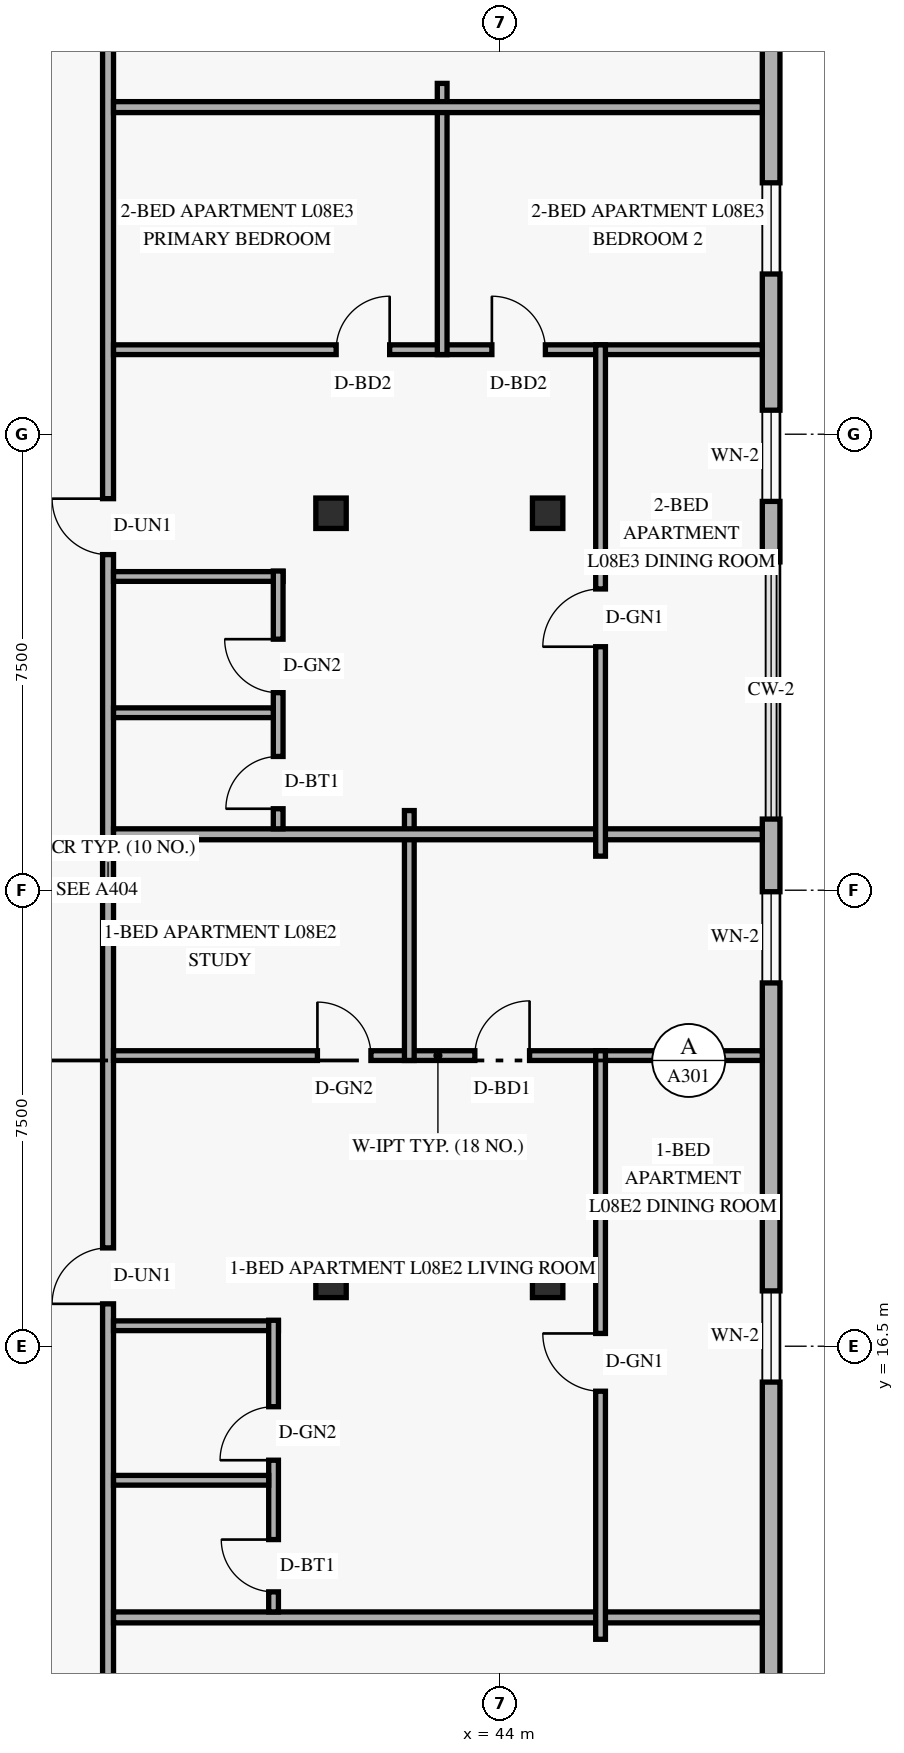
"""IFC4 building model, lengths in metres.
Left out: names, types, materials, properties, quantities, classifications, styles, units other than length and angle.
Written with IfcOpenShell. Run it as: python <this file> out.ifc"""

import sys

from ifc_helpers import new_model, si_unit, direction, frame, frame_2d, origin, origin_2d, place, context, subcontext, project, spatial, rectangle, hollow_rectangle, extrude, element, fill, save


model = new_model("IFC4")
c1 = context("Model", 3, precision=1e-05, world=origin(), true_north=direction((0.0, 1.0)))
c2 = subcontext(c1, "Body", "Model", "MODEL_VIEW")
j1 = project(units=[si_unit("LENGTHUNIT", "METRE"), si_unit("PLANEANGLEUNIT", "RADIAN")], contexts=[c1])
p1 = place(None, origin())
s1 = spatial("IfcSite", under=j1, at=p1, CompositionType="ELEMENT")
p2 = place(p1, origin())
s2 = spatial("IfcBuilding", under=s1, at=p2, CompositionType="ELEMENT")
p3 = place(p2, frame((0.0, 0.0, 34.8)))
s3 = spatial("IfcBuildingStorey", under=s2, at=p3, CompositionType="ELEMENT", Elevation=34.8)
for number, where, z_axis, x_axis in (
    (1, (41.154, 17.55, 0.0), (0.035, 0.0, 0.999), (0.0, 1.0, 0.0)),
    (2, (41.154, 30.2, 0.0), (0.035, 0.0, 0.999), (0.0, 1.0, 0.0)),
):
    element("IfcColumn", number, at=place(p3, frame(where, z_axis=z_axis, x_axis=x_axis)), inside=s3, PredefinedType="COLUMN", context=c2, shape_type="SweptSolid", body=[
        extrude(hollow_rectangle(XDim=0.5, YDim=0.5, WallThickness=0.022, at=origin_2d()), origin(), (0.0, 0.0, 1.0), 3.602),
    ])
for number, where, z_axis, x_axis in (
    (3, (44.675, 17.55, 0.0), (0.058, 0.0, 0.998), (0.0, 1.0, 0.0)),
    (4, (44.675, 30.2, 0.0), (0.058, 0.0, 0.998), (0.0, 1.0, 0.0)),
):
    element("IfcColumn", number, at=place(p3, frame(where, z_axis=z_axis, x_axis=x_axis)), inside=s3, PredefinedType="COLUMN", context=c2, shape_type="SweptSolid", body=[
        extrude(hollow_rectangle(XDim=0.5, YDim=0.5, WallThickness=0.022, at=origin_2d()), origin(), (0.0, 0.0, 1.0), 3.606),
    ])
p4 = place(p3, frame((48.455, 4.62, 0.0), z_axis=(0.0, 0.0, 1.0), x_axis=(0.0, 1.0, 0.0)))
e5 = element("IfcWall", 5, at=p4, inside=s3, PredefinedType="SOLIDWALL", context=c2, shape_type="SweptSolid", body=[
    extrude(rectangle(XDim=20.55, YDim=0.29, at=frame_2d((10.275, 0.0))), origin(), (0.0, 0.0, 1.0), 3.36),
])
p5 = place(p4, frame((2.96, 0.0, 0.85)))
e6 = element("IfcOpeningElement", 6, at=p5, cuts=e5, PredefinedType="OPENING", context=c2, shape_type="SweptSolid", body=[
    extrude(rectangle(XDim=1.5, YDim=1.55, at=frame_2d((0.75, 0.775))), frame((0.0, 0.155, 0.0), z_axis=(0.0, -1.0, 0.0), x_axis=(1.0, 0.0, 0.0)), (0.0, 0.0, 1.0), 0.31),
])
p6 = place(p4, frame((11.29, 0.0, 0.85)))
e7 = element("IfcOpeningElement", 7, at=p6, cuts=e5, PredefinedType="OPENING", context=c2, shape_type="SweptSolid", body=[
    extrude(rectangle(XDim=1.5, YDim=1.55, at=frame_2d((0.75, 0.775))), frame((0.0, 0.155, 0.0), z_axis=(0.0, -1.0, 0.0), x_axis=(1.0, 0.0, 0.0)), (0.0, 0.0, 1.0), 0.31),
])
p7 = place(p4, frame((17.855, 0.0, 0.85)))
e8 = element("IfcOpeningElement", 8, at=p7, cuts=e5, PredefinedType="OPENING", context=c2, shape_type="SweptSolid", body=[
    extrude(rectangle(XDim=1.5, YDim=1.55, at=frame_2d((0.75, 0.775))), frame((0.0, 0.155, 0.0), z_axis=(0.0, -1.0, 0.0), x_axis=(1.0, 0.0, 0.0)), (0.0, 0.0, 1.0), 0.31),
])
p8 = place(p3, frame((48.455, 29.4, 0.0), z_axis=(0.0, 0.0, 1.0), x_axis=(0.0, 1.0, 0.0)))
e9 = element("IfcWall", 9, at=p8, inside=s3, PredefinedType="SOLIDWALL", context=c2, shape_type="SweptSolid", body=[
    extrude(rectangle(XDim=13.98, YDim=0.29, at=frame_2d((6.99, 0.0))), origin(), (0.0, 0.0, 1.0), 3.36),
])
p9 = place(p8, frame((0.995, 0.0, 0.85)))
e10 = element("IfcOpeningElement", 10, at=p9, cuts=e9, PredefinedType="OPENING", context=c2, shape_type="SweptSolid", body=[
    extrude(rectangle(XDim=1.5, YDim=1.55, at=frame_2d((0.75, 0.775))), frame((0.0, 0.155, 0.0), z_axis=(0.0, -1.0, 0.0), x_axis=(1.0, 0.0, 0.0)), (0.0, 0.0, 1.0), 0.31),
])
p10 = place(p8, frame((4.735, 0.0, 0.85)))
e11 = element("IfcOpeningElement", 11, at=p10, cuts=e9, PredefinedType="OPENING", context=c2, shape_type="SweptSolid", body=[
    extrude(rectangle(XDim=1.5, YDim=1.55, at=frame_2d((0.75, 0.775))), frame((0.0, 0.155, 0.0), z_axis=(0.0, -1.0, 0.0), x_axis=(1.0, 0.0, 0.0)), (0.0, 0.0, 1.0), 0.31),
])
p11 = place(p8, frame((9.98, 0.0, 0.85)))
e12 = element("IfcOpeningElement", 12, at=p11, cuts=e9, PredefinedType="OPENING", context=c2, shape_type="SweptSolid", body=[
    extrude(rectangle(XDim=1.5, YDim=1.55, at=frame_2d((0.75, 0.775))), frame((0.0, 0.155, 0.0), z_axis=(0.0, -1.0, 0.0), x_axis=(1.0, 0.0, 0.0)), (0.0, 0.0, 1.0), 0.31),
])
p12 = place(p3, frame((37.55, 1.29, 0.0), z_axis=(0.0, 0.0, 1.0), x_axis=(0.0, 1.0, 0.0)))
e13 = element("IfcWall", 13, at=p12, inside=s3, PredefinedType="STANDARD", context=c2, shape_type="SweptSolid", body=[
    extrude(rectangle(XDim=45.42, YDim=0.18, at=frame_2d((22.71, 0.0))), origin(), (0.0, 0.0, 1.0), 2.649),
])
p13 = place(p12, frame((4.46, 0.0, 0.0)))
e14 = element("IfcOpeningElement", 14, at=p13, cuts=e13, PredefinedType="OPENING", context=c2, shape_type="SweptSolid", body=[
    extrude(rectangle(XDim=0.92, YDim=2.15, at=frame_2d((0.46, 1.075))), frame((0.0, 0.1, 0.0), z_axis=(0.0, -1.0, 0.0), x_axis=(1.0, 0.0, 0.0)), (0.0, 0.0, 1.0), 0.2),
])
p14 = place(p12, frame((15.907, 0.0, 0.0)))
e15 = element("IfcOpeningElement", 15, at=p14, cuts=e13, PredefinedType="OPENING", context=c2, shape_type="SweptSolid", body=[
    extrude(rectangle(XDim=0.92, YDim=2.15, at=frame_2d((0.46, 1.075))), frame((0.0, 0.1, 0.0), z_axis=(0.0, -1.0, 0.0), x_axis=(1.0, 0.0, 0.0)), (0.0, 0.0, 1.0), 0.2),
])
p15 = place(p12, frame((28.23, 0.0, 0.0)))
e16 = element("IfcOpeningElement", 16, at=p15, cuts=e13, PredefinedType="OPENING", context=c2, shape_type="SweptSolid", body=[
    extrude(rectangle(XDim=0.92, YDim=2.15, at=frame_2d((0.46, 1.075))), frame((0.0, 0.1, 0.0), z_axis=(0.0, -1.0, 0.0), x_axis=(1.0, 0.0, 0.0)), (0.0, 0.0, 1.0), 0.2),
])
p16 = place(p12, frame((40.02, 0.0, 0.0)))
e17 = element("IfcOpeningElement", 17, at=p16, cuts=e13, PredefinedType="OPENING", context=c2, shape_type="SweptSolid", body=[
    extrude(rectangle(XDim=0.92, YDim=2.15, at=frame_2d((0.46, 1.075))), frame((0.0, 0.1, 0.0), z_axis=(0.0, -1.0, 0.0), x_axis=(1.0, 0.0, 0.0)), (0.0, 0.0, 1.0), 0.2),
])
p17 = place(p3, frame((37.64, 12.04, 0.0), z_axis=(0.0, 0.0, 1.0), x_axis=(1.0, 0.0, 0.0)))
e18 = element("IfcWall", 18, at=p17, inside=s3, PredefinedType="PARTITIONING", context=c2, shape_type="SweptSolid", body=[
    extrude(rectangle(XDim=10.67, YDim=0.18, at=frame_2d((5.335, 0.0))), origin(), (0.0, 0.0, 1.0), 2.649),
])
p18 = place(p3, frame((37.64, 21.28, 0.0), z_axis=(0.0, 0.0, 1.0), x_axis=(1.0, 0.0, 0.0)))
e19 = element("IfcWall", 19, at=p18, inside=s3, PredefinedType="PARTITIONING", context=c2, shape_type="SweptSolid", body=[
    extrude(rectangle(XDim=10.67, YDim=0.16, at=frame_2d((5.335, 0.0))), origin(), (0.0, 0.0, 1.0), 2.649),
])
p19 = place(p18, frame((3.353, 0.0, 0.0)))
e20 = element("IfcOpeningElement", 20, at=p19, cuts=e19, PredefinedType="OPENING", context=c2, shape_type="SweptSolid", body=[
    extrude(rectangle(XDim=0.88, YDim=2.12, at=frame_2d((0.44, 1.06))), frame((0.0, 0.09, 0.0), z_axis=(0.0, -1.0, 0.0), x_axis=(1.0, 0.0, 0.0)), (0.0, 0.0, 1.0), 0.18),
])
p20 = place(p18, frame((5.942, 0.0, 0.0)))
e21 = element("IfcOpeningElement", 21, at=p20, cuts=e19, PredefinedType="OPENING", context=c2, shape_type="SweptSolid", body=[
    extrude(rectangle(XDim=0.9, YDim=2.14, at=frame_2d((0.45, 1.07))), frame((0.0, 0.09, 0.0), z_axis=(0.0, -1.0, 0.0), x_axis=(1.0, 0.0, 0.0)), (0.0, 0.0, 1.0), 0.18),
])
p21 = place(p3, frame((37.64, 16.837, 0.0), z_axis=(0.0, 0.0, 1.0), x_axis=(1.0, 0.0, 0.0)))
e22 = element("IfcWall", 22, at=p21, inside=s3, PredefinedType="PLUMBINGWALL", context=c2, shape_type="SweptSolid", body=[
    extrude(rectangle(XDim=2.712, YDim=0.16, at=frame_2d((1.356, 0.0))), origin(), (0.0, 0.0, 1.0), 3.36),
])
p22 = place(p3, frame((40.272, 12.13, 0.0), z_axis=(0.0, 0.0, 1.0), x_axis=(0.0, 1.0, 0.0)))
e23 = element("IfcWall", 23, at=p22, inside=s3, PredefinedType="PLUMBINGWALL", context=c2, shape_type="SweptSolid", body=[
    extrude(rectangle(XDim=4.797, YDim=0.16, at=frame_2d((2.398, 0.0))), origin(), (0.0, 0.0, 1.0), 2.932),
])
p23 = place(p22, frame((0.33, 0.0, 0.0)))
e24 = element("IfcOpeningElement", 24, at=p23, cuts=e23, PredefinedType="OPENING", context=c2, shape_type="SweptSolid", body=[
    extrude(rectangle(XDim=0.86, YDim=2.12, at=frame_2d((0.43, 1.06))), frame((0.0, 0.09, 0.0), z_axis=(0.0, -1.0, 0.0), x_axis=(1.0, 0.0, 0.0)), (0.0, 0.0, 1.0), 0.18),
])
p24 = place(p22, frame((2.495, 0.0, 0.0)))
e25 = element("IfcOpeningElement", 25, at=p24, cuts=e23, PredefinedType="OPENING", context=c2, shape_type="SweptSolid", body=[
    extrude(rectangle(XDim=0.88, YDim=2.12, at=frame_2d((0.44, 1.06))), frame((0.0, 0.09, 0.0), z_axis=(0.0, -1.0, 0.0), x_axis=(1.0, 0.0, 0.0)), (0.0, 0.0, 1.0), 0.18),
])
p25 = place(p3, frame((37.64, 14.295, 0.0), z_axis=(0.0, 0.0, 1.0), x_axis=(1.0, 0.0, 0.0)))
e26 = element("IfcWall", 26, at=p25, inside=s3, PredefinedType="PLUMBINGWALL", context=c2, shape_type="SweptSolid", body=[
    extrude(rectangle(XDim=2.552, YDim=0.16, at=frame_2d((1.276, 0.0))), origin(), (0.0, 0.0, 1.0), 3.36),
])
p26 = place(p3, frame((45.65, 11.68, 0.0), z_axis=(0.0, 0.0, 1.0), x_axis=(0.0, 1.0, 0.0)))
e27 = element("IfcWall", 27, at=p26, inside=s3, PredefinedType="PARTITIONING", context=c2, shape_type="SweptSolid", body=[
    extrude(rectangle(XDim=9.68, YDim=0.16, at=frame_2d((4.84, 0.0))), origin(), (0.0, 0.0, 1.0), 3.36),
])
p27 = place(p26, frame((4.08, 0.0, 0.0)))
e28 = element("IfcOpeningElement", 28, at=p27, cuts=e27, PredefinedType="OPENING", context=c2, shape_type="SweptSolid", body=[
    extrude(rectangle(XDim=0.95, YDim=2.15, at=frame_2d((0.475, 1.075))), frame((0.0, 0.09, 0.0), z_axis=(0.0, -1.0, 0.0), x_axis=(1.0, 0.0, 0.0)), (0.0, 0.0, 1.0), 0.18),
])
p28 = place(p3, frame((42.504, 21.2, 0.0), z_axis=(0.0, 0.0, 1.0), x_axis=(0.0, 1.0, 0.0)))
e29 = element("IfcWall", 29, at=p28, inside=s3, PredefinedType="PARTITIONING", context=c2, shape_type="SweptSolid", body=[
    extrude(rectangle(XDim=4.11, YDim=0.16, at=frame_2d((2.055, 0.0))), origin(), (0.0, 0.0, 1.0), 2.932),
])
p29 = place(p3, frame((37.64, 24.92, 0.0), z_axis=(0.0, 0.0, 1.0), x_axis=(1.0, 0.0, 0.0)))
e30 = element("IfcWall", 30, at=p29, inside=s3, PredefinedType="PARTITIONING", context=c2, shape_type="SweptSolid", body=[
    extrude(rectangle(XDim=10.67, YDim=0.18, at=frame_2d((5.335, 0.0))), origin(), (0.0, 0.0, 1.0), 2.649),
])
p30 = place(p3, frame((37.64, 32.89, 0.0), z_axis=(0.0, 0.0, 1.0), x_axis=(1.0, 0.0, 0.0)))
e31 = element("IfcWall", 31, at=p30, inside=s3, PredefinedType="PARTITIONING", context=c2, shape_type="SweptSolid", body=[
    extrude(rectangle(XDim=10.67, YDim=0.16, at=frame_2d((5.335, 0.0))), origin(), (0.0, 0.0, 1.0), 2.649),
])
p31 = place(p30, frame((3.662, 0.0, 0.0)))
e32 = element("IfcOpeningElement", 32, at=p31, cuts=e31, PredefinedType="OPENING", context=c2, shape_type="SweptSolid", body=[
    extrude(rectangle(XDim=0.88, YDim=2.14, at=frame_2d((0.44, 1.07))), frame((0.0, 0.09, 0.0), z_axis=(0.0, -1.0, 0.0), x_axis=(1.0, 0.0, 0.0)), (0.0, 0.0, 1.0), 0.18),
])
p32 = place(p30, frame((6.222, 0.0, 0.0)))
e33 = element("IfcOpeningElement", 33, at=p32, cuts=e31, PredefinedType="OPENING", context=c2, shape_type="SweptSolid", body=[
    extrude(rectangle(XDim=0.88, YDim=2.14, at=frame_2d((0.44, 1.07))), frame((0.0, 0.09, 0.0), z_axis=(0.0, -1.0, 0.0), x_axis=(1.0, 0.0, 0.0)), (0.0, 0.0, 1.0), 0.18),
])
p33 = place(p3, frame((37.64, 29.16, 0.0), z_axis=(0.0, 0.0, 1.0), x_axis=(1.0, 0.0, 0.0)))
e34 = element("IfcWall", 34, at=p33, inside=s3, PredefinedType="PLUMBINGWALL", context=c2, shape_type="SweptSolid", body=[
    extrude(rectangle(XDim=2.788, YDim=0.16, at=frame_2d((1.394, 0.0))), origin(), (0.0, 0.0, 1.0), 3.36),
])
p34 = place(p3, frame((40.348, 25.01, 0.0), z_axis=(0.0, 0.0, 1.0), x_axis=(0.0, 1.0, 0.0)))
e35 = element("IfcWall", 35, at=p34, inside=s3, PredefinedType="PLUMBINGWALL", context=c2, shape_type="SweptSolid", body=[
    extrude(rectangle(XDim=4.24, YDim=0.16, at=frame_2d((2.12, 0.0))), origin(), (0.0, 0.0, 1.0), 3.36),
])
p35 = place(p34, frame((0.33, 0.0, 0.0)))
e36 = element("IfcOpeningElement", 36, at=p35, cuts=e35, PredefinedType="OPENING", context=c2, shape_type="SweptSolid", body=[
    extrude(rectangle(XDim=0.86, YDim=2.12, at=frame_2d((0.43, 1.06))), frame((0.0, 0.09, 0.0), z_axis=(0.0, -1.0, 0.0), x_axis=(1.0, 0.0, 0.0)), (0.0, 0.0, 1.0), 0.18),
])
p36 = place(p34, frame((2.239, 0.0, 0.0)))
e37 = element("IfcOpeningElement", 37, at=p36, cuts=e35, PredefinedType="OPENING", context=c2, shape_type="SweptSolid", body=[
    extrude(rectangle(XDim=0.88, YDim=2.12, at=frame_2d((0.44, 1.06))), frame((0.0, 0.09, 0.0), z_axis=(0.0, -1.0, 0.0), x_axis=(1.0, 0.0, 0.0)), (0.0, 0.0, 1.0), 0.18),
])
p37 = place(p3, frame((37.64, 26.919, 0.0), z_axis=(0.0, 0.0, 1.0), x_axis=(1.0, 0.0, 0.0)))
e38 = element("IfcWall", 38, at=p37, inside=s3, PredefinedType="PLUMBINGWALL", context=c2, shape_type="SweptSolid", body=[
    extrude(rectangle(XDim=2.628, YDim=0.16, at=frame_2d((1.314, 0.0))), origin(), (0.0, 0.0, 1.0), 3.36),
])
p38 = place(p3, frame((45.65, 24.56, 0.0), z_axis=(0.0, 0.0, 1.0), x_axis=(0.0, 1.0, 0.0)))
e39 = element("IfcWall", 39, at=p38, inside=s3, PredefinedType="PARTITIONING", context=c2, shape_type="SweptSolid", body=[
    extrude(rectangle(XDim=8.41, YDim=0.16, at=frame_2d((4.205, 0.0))), origin(), (0.0, 0.0, 1.0), 3.36),
])
p39 = place(p38, frame((3.445, 0.0, 0.0)))
e40 = element("IfcOpeningElement", 40, at=p39, cuts=e39, PredefinedType="OPENING", context=c2, shape_type="SweptSolid", body=[
    extrude(rectangle(XDim=0.95, YDim=2.15, at=frame_2d((0.475, 1.075))), frame((0.0, 0.09, 0.0), z_axis=(0.0, -1.0, 0.0), x_axis=(1.0, 0.0, 0.0)), (0.0, 0.0, 1.0), 0.18),
])
p40 = place(p3, frame((43.045, 32.81, 0.0), z_axis=(0.0, 0.0, 1.0), x_axis=(0.0, 1.0, 0.0)))
e41 = element("IfcWall", 41, at=p40, inside=s3, PredefinedType="PARTITIONING", context=c2, shape_type="SweptSolid", body=[
    extrude(rectangle(XDim=4.46, YDim=0.16, at=frame_2d((2.23, 0.0))), origin(), (0.0, 0.0, 1.0), 2.932),
])
p41 = place(p3, frame((37.64, 36.88, 0.0), z_axis=(0.0, 0.0, 1.0), x_axis=(1.0, 0.0, 0.0)))
e42 = element("IfcWall", 42, at=p41, inside=s3, PredefinedType="PARTITIONING", context=c2, shape_type="SweptSolid", body=[
    extrude(rectangle(XDim=10.67, YDim=0.18, at=frame_2d((5.335, 0.0))), origin(), (0.0, 0.0, 1.0), 2.649),
])
p42 = place(p6, origin())
e43 = element("IfcWindow", 43, at=p42, inside=s3, PartitioningType="SINGLE_PANEL", PredefinedType="WINDOW", context=c2, shape_type="SweptSolid", body=[
    extrude(rectangle(XDim=1.5, YDim=1.55, at=frame_2d((0.75, 0.775))), frame((0.0, 0.03, 0.0), z_axis=(0.0, -1.0, 0.0), x_axis=(1.0, 0.0, 0.0)), (0.0, 0.0, 1.0), 0.06),
])
fill(e7, e43)
p43 = place(p7, origin())
e44 = element("IfcWindow", 44, at=p43, inside=s3, PartitioningType="SINGLE_PANEL", PredefinedType="WINDOW", context=c2, shape_type="SweptSolid", body=[
    extrude(rectangle(XDim=1.5, YDim=1.55, at=frame_2d((0.75, 0.775))), frame((0.0, 0.03, 0.0), z_axis=(0.0, -1.0, 0.0), x_axis=(1.0, 0.0, 0.0)), (0.0, 0.0, 1.0), 0.06),
])
fill(e8, e44)
p44 = place(p9, origin())
e45 = element("IfcWindow", 45, at=p44, inside=s3, PartitioningType="SINGLE_PANEL", PredefinedType="WINDOW", context=c2, shape_type="SweptSolid", body=[
    extrude(rectangle(XDim=1.5, YDim=1.55, at=frame_2d((0.75, 0.775))), frame((0.0, 0.03, 0.0), z_axis=(0.0, -1.0, 0.0), x_axis=(1.0, 0.0, 0.0)), (0.0, 0.0, 1.0), 0.06),
])
fill(e10, e45)
p45 = place(p10, origin())
e46 = element("IfcWindow", 46, at=p45, inside=s3, PartitioningType="SINGLE_PANEL", PredefinedType="WINDOW", context=c2, shape_type="SweptSolid", body=[
    extrude(rectangle(XDim=1.5, YDim=1.55, at=frame_2d((0.75, 0.775))), frame((0.0, 0.03, 0.0), z_axis=(0.0, -1.0, 0.0), x_axis=(1.0, 0.0, 0.0)), (0.0, 0.0, 1.0), 0.06),
])
fill(e11, e46)
p46 = place(p27, origin())
e47 = element("IfcDoor", 47, at=p46, inside=s3, OperationType="SINGLE_SWING_RIGHT", PredefinedType="DOOR", context=c2, shape_type="SweptSolid", body=[
    extrude(rectangle(XDim=0.95, YDim=2.15, at=frame_2d((0.475, 1.075))), frame((0.0, 0.025, 0.0), z_axis=(0.0, -1.0, 0.0), x_axis=(1.0, 0.0, 0.0)), (0.0, 0.0, 1.0), 0.05),
])
fill(e28, e47)
p47 = place(p14, origin())
e48 = element("IfcDoor", 48, at=p47, inside=s3, OperationType="SINGLE_SWING_LEFT", PredefinedType="DOOR", context=c2, shape_type="SweptSolid", body=[
    extrude(rectangle(XDim=0.92, YDim=2.15, at=frame_2d((0.46, 1.075))), frame((0.0, 0.025, 0.0), z_axis=(0.0, -1.0, 0.0), x_axis=(1.0, 0.0, 0.0)), (0.0, 0.0, 1.0), 0.05),
])
fill(e15, e48)
p48 = place(p23, origin())
e49 = element("IfcDoor", 49, at=p48, inside=s3, OperationType="SINGLE_SWING_RIGHT", PredefinedType="DOOR", context=c2, shape_type="SweptSolid", body=[
    extrude(rectangle(XDim=0.86, YDim=2.12, at=frame_2d((0.43, 1.06))), frame((0.0, 0.025, 0.0), z_axis=(0.0, -1.0, 0.0), x_axis=(1.0, 0.0, 0.0)), (0.0, 0.0, 1.0), 0.05),
])
fill(e24, e49)
p49 = place(p24, origin())
e50 = element("IfcDoor", 50, at=p49, inside=s3, OperationType="SINGLE_SWING_LEFT", PredefinedType="DOOR", context=c2, shape_type="SweptSolid", body=[
    extrude(rectangle(XDim=0.88, YDim=2.12, at=frame_2d((0.44, 1.06))), frame((0.0, 0.025, 0.0), z_axis=(0.0, -1.0, 0.0), x_axis=(1.0, 0.0, 0.0)), (0.0, 0.0, 1.0), 0.05),
])
fill(e25, e50)
p50 = place(p19, origin())
e51 = element("IfcDoor", 51, at=p50, inside=s3, OperationType="SINGLE_SWING_LEFT", PredefinedType="DOOR", context=c2, shape_type="SweptSolid", body=[
    extrude(rectangle(XDim=0.88, YDim=2.12, at=frame_2d((0.44, 1.06))), frame((0.0, 0.025, 0.0), z_axis=(0.0, -1.0, 0.0), x_axis=(1.0, 0.0, 0.0)), (0.0, 0.0, 1.0), 0.05),
])
fill(e20, e51)
p51 = place(p20, origin())
e52 = element("IfcDoor", 52, at=p51, inside=s3, OperationType="SINGLE_SWING_RIGHT", PredefinedType="DOOR", context=c2, shape_type="SweptSolid", body=[
    extrude(rectangle(XDim=0.9, YDim=2.14, at=frame_2d((0.45, 1.07))), frame((0.0, 0.025, 0.0), z_axis=(0.0, -1.0, 0.0), x_axis=(1.0, 0.0, 0.0)), (0.0, 0.0, 1.0), 0.05),
])
fill(e21, e52)
p52 = place(p39, origin())
e53 = element("IfcDoor", 53, at=p52, inside=s3, OperationType="SINGLE_SWING_LEFT", PredefinedType="DOOR", context=c2, shape_type="SweptSolid", body=[
    extrude(rectangle(XDim=0.95, YDim=2.15, at=frame_2d((0.475, 1.075))), frame((0.0, 0.025, 0.0), z_axis=(0.0, -1.0, 0.0), x_axis=(1.0, 0.0, 0.0)), (0.0, 0.0, 1.0), 0.05),
])
fill(e40, e53)
p53 = place(p15, origin())
e54 = element("IfcDoor", 54, at=p53, inside=s3, OperationType="SINGLE_SWING_RIGHT", PredefinedType="DOOR", context=c2, shape_type="SweptSolid", body=[
    extrude(rectangle(XDim=0.92, YDim=2.15, at=frame_2d((0.46, 1.075))), frame((0.0, 0.025, 0.0), z_axis=(0.0, -1.0, 0.0), x_axis=(1.0, 0.0, 0.0)), (0.0, 0.0, 1.0), 0.05),
])
fill(e16, e54)
p54 = place(p35, origin())
e55 = element("IfcDoor", 55, at=p54, inside=s3, OperationType="SINGLE_SWING_LEFT", PredefinedType="DOOR", context=c2, shape_type="SweptSolid", body=[
    extrude(rectangle(XDim=0.86, YDim=2.12, at=frame_2d((0.43, 1.06))), frame((0.0, 0.025, 0.0), z_axis=(0.0, -1.0, 0.0), x_axis=(1.0, 0.0, 0.0)), (0.0, 0.0, 1.0), 0.05),
])
fill(e36, e55)
p55 = place(p36, origin())
e56 = element("IfcDoor", 56, at=p55, inside=s3, OperationType="SINGLE_SWING_RIGHT", PredefinedType="DOOR", context=c2, shape_type="SweptSolid", body=[
    extrude(rectangle(XDim=0.88, YDim=2.12, at=frame_2d((0.44, 1.06))), frame((0.0, 0.025, 0.0), z_axis=(0.0, -1.0, 0.0), x_axis=(1.0, 0.0, 0.0)), (0.0, 0.0, 1.0), 0.05),
])
fill(e37, e56)
p56 = place(p31, origin())
e57 = element("IfcDoor", 57, at=p56, inside=s3, OperationType="SINGLE_SWING_RIGHT", PredefinedType="DOOR", context=c2, shape_type="SweptSolid", body=[
    extrude(rectangle(XDim=0.88, YDim=2.14, at=frame_2d((0.44, 1.07))), frame((0.0, 0.025, 0.0), z_axis=(0.0, -1.0, 0.0), x_axis=(1.0, 0.0, 0.0)), (0.0, 0.0, 1.0), 0.05),
])
fill(e32, e57)
p57 = place(p32, origin())
e58 = element("IfcDoor", 58, at=p57, inside=s3, OperationType="SINGLE_SWING_LEFT", PredefinedType="DOOR", context=c2, shape_type="SweptSolid", body=[
    extrude(rectangle(XDim=0.88, YDim=2.14, at=frame_2d((0.44, 1.07))), frame((0.0, 0.025, 0.0), z_axis=(0.0, -1.0, 0.0), x_axis=(1.0, 0.0, 0.0)), (0.0, 0.0, 1.0), 0.05),
])
fill(e33, e58)
save(model, sys.argv[1])
